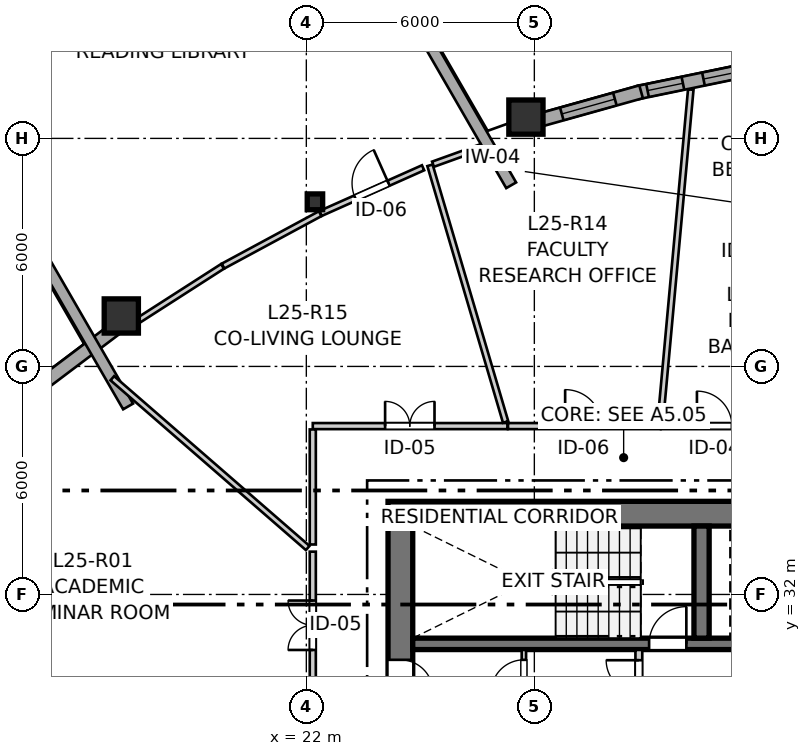
"""IFC4 building model, lengths in metres.
Left out: names, types, materials, properties, quantities, classifications, styles, units other than length and angle.
Written with IfcOpenShell. Run it as: python <this file> out.ifc"""

import sys

from ifc_helpers import new_model, si_unit, direction, frame, frame_2d, origin, origin_2d, place, context, subcontext, project, spatial, rectangle, i_section, extrude, source, transform, mapped, element, fill, save


model = new_model("IFC4")
c1 = context("Model", 3, precision=1e-05, world=origin(), true_north=direction((0.0, 1.0)))
c2 = subcontext(c1, "Body", "Model", "MODEL_VIEW")
j1 = project(units=[si_unit("LENGTHUNIT", "METRE"), si_unit("PLANEANGLEUNIT", "RADIAN")], contexts=[c1])
p1 = place(None, origin())
s1 = spatial("IfcSite", under=j1, at=p1, CompositionType="ELEMENT")
p2 = place(p1, origin())
s2 = spatial("IfcBuilding", under=s1, at=p2, CompositionType="ELEMENT")
p3 = place(p2, frame((0.0, 0.0, 86.4)))
s3 = spatial("IfcBuildingStorey", under=s2, at=p3, CompositionType="ELEMENT", Elevation=86.4)
p4 = place(p3, frame((36.55, 34.125, 0.0), z_axis=(0.0, 0.0, 1.0), x_axis=(-1.0, 0.0, 0.0)))
e1 = element("IfcWall", 1, at=p4, inside=s3, PredefinedType="SHEAR", context=c2, shape_type="SweptSolid", body=[
    extrude(rectangle(XDim=12.4, YDim=0.65, at=frame_2d((6.2, 0.0))), origin(), (0.0, 0.0, 1.0), 2.95),
])
p5 = place(p3, frame((24.475, 33.8, 0.0), z_axis=(0.0, 0.0, 1.0), x_axis=(0.0, -1.0, 0.0)))
e2 = element("IfcWall", 2, at=p5, inside=s3, PredefinedType="SHEAR", context=c2, shape_type="SweptSolid", body=[
    extrude(rectangle(XDim=15.6, YDim=0.65, at=frame_2d((7.8, 0.0))), origin(), (0.0, 0.0, 1.0), 2.95),
])
p6 = place(p5, frame((7.05, 0.0, 0.0)))
e3 = element("IfcOpeningElement", 3, at=p6, cuts=e2, PredefinedType="OPENING", context=c2, shape_type="SweptSolid", body=[
    extrude(rectangle(XDim=1.5, YDim=2.15, at=frame_2d((0.75, 1.075))), frame((0.0, 0.335, 0.0), z_axis=(0.0, -1.0, 0.0), x_axis=(1.0, 0.0, 0.0)), (0.0, 0.0, 1.0), 0.67),
])
p7 = place(p5, frame((3.52, 0.0, 0.0)))
e4 = element("IfcOpeningElement", 4, at=p7, cuts=e2, PredefinedType="OPENING", context=c2, shape_type="SweptSolid", body=[
    extrude(rectangle(XDim=0.86, YDim=2.05, at=frame_2d((0.43, 1.025))), frame((0.0, 0.335, 0.0), z_axis=(0.0, -1.0, 0.0), x_axis=(1.0, 0.0, 0.0)), (0.0, 0.0, 1.0), 0.67),
])
p8 = place(p5, frame((11.22, 0.0, 0.0)))
e5 = element("IfcOpeningElement", 5, at=p8, cuts=e2, PredefinedType="OPENING", context=c2, shape_type="SweptSolid", body=[
    extrude(rectangle(XDim=0.86, YDim=2.05, at=frame_2d((0.43, 1.025))), frame((0.0, 0.335, 0.0), z_axis=(0.0, -1.0, 0.0), x_axis=(1.0, 0.0, 0.0)), (0.0, 0.0, 1.0), 0.67),
])
p9 = place(p3, frame((24.8, 30.7, 0.0), z_axis=(0.0, 0.0, 1.0), x_axis=(1.0, 0.0, 0.0)))
e6 = element("IfcWall", 6, at=p9, inside=s3, PredefinedType="SHEAR", context=c2, shape_type="SweptSolid", body=[
    extrude(rectangle(XDim=11.1, YDim=0.3, at=frame_2d((5.55, 0.0))), origin(), (0.0, 0.0, 1.0), 2.95),
])
p10 = place(p9, frame((6.22, 0.0, 0.0)))
e7 = element("IfcOpeningElement", 7, at=p10, cuts=e6, PredefinedType="OPENING", context=c2, shape_type="SweptSolid", body=[
    extrude(rectangle(XDim=0.98, YDim=2.15, at=frame_2d((0.49, 1.075))), frame((0.0, 0.16, 0.0), z_axis=(0.0, -1.0, 0.0), x_axis=(1.0, 0.0, 0.0)), (0.0, 0.0, 1.0), 0.32),
])
p11 = place(p9, frame((9.15, 0.0, 0.0)))
e8 = element("IfcOpeningElement", 8, at=p11, cuts=e6, PredefinedType="OPENING", context=c2, shape_type="SweptSolid", body=[
    extrude(rectangle(XDim=1.15, YDim=2.15, at=frame_2d((0.575, 1.075))), frame((0.0, 0.16, 0.0), z_axis=(0.0, -1.0, 0.0), x_axis=(1.0, 0.0, 0.0)), (0.0, 0.0, 1.0), 0.32),
])
p12 = place(p3, frame((32.4, 30.85, 0.0), z_axis=(0.0, 0.0, 1.0), x_axis=(0.0, 1.0, 0.0)))
e9 = element("IfcWall", 9, at=p12, inside=s3, PredefinedType="SHEAR", context=c2, shape_type="SweptSolid", body=[
    extrude(rectangle(XDim=2.95, YDim=0.4, at=frame_2d((1.475, 0.0))), origin(), (0.0, 0.0, 1.0), 2.95),
])
m1 = source(origin(), c2, "Body", "SweptSolid", [
    extrude(rectangle(XDim=0.9, YDim=0.9, at=origin_2d()), origin(), (0.0, 0.0, 1.0), 2.95),
])
p13 = place(p3, frame((27.779, 44.561, 0.0), z_axis=(0.0, 0.0, 1.0), x_axis=(1.0, 0.0, 0.0)))
e10 = element("IfcColumn", 10, at=p13, inside=s3, PredefinedType="COLUMN", context=c2, shape_type="MappedRepresentation", body=[
    mapped(m1, transform((0.0, 0.0, 0.0), x_axis=(1.0, 0.0, 0.0), y_axis=(0.0, 1.0, 0.0), z_axis=(0.0, 0.0, 1.0), scale=1.0)),
])
m2 = source(origin(), c2, "Body", "SweptSolid", [
    extrude(i_section(OverallWidth=0.406, OverallDepth=0.416, WebThickness=0.027, FlangeThickness=0.044, FilletRadius=0.015, at=origin_2d()), origin(), (0.0, 0.0, 1.0), 2.95),
])
p14 = place(p3, frame((22.227, 42.331, 0.0), z_axis=(0.0, 0.0, 1.0), x_axis=(1.0, 0.0, 0.0)))
e11 = element("IfcColumn", 11, at=p14, inside=s3, PredefinedType="PILASTER", context=c2, shape_type="MappedRepresentation", body=[
    mapped(m2, transform((0.0, 0.0, 0.0), x_axis=(1.0, 0.0, 0.0), y_axis=(0.0, 1.0, 0.0), z_axis=(0.0, 0.0, 1.0), scale=1.0)),
])
p15 = place(p3, frame((17.131, 39.327, 0.0), z_axis=(0.0, 0.0, 1.0), x_axis=(1.0, 0.0, 0.0)))
e12 = element("IfcColumn", 12, at=p15, inside=s3, PredefinedType="COLUMN", context=c2, shape_type="MappedRepresentation", body=[
    mapped(m1, transform((0.0, 0.0, 0.0), x_axis=(1.0, 0.0, 0.0), y_axis=(0.0, 1.0, 0.0), z_axis=(0.0, 0.0, 1.0), scale=1.0)),
])
p16 = place(p3, frame((33.803, 45.84, 0.0), z_axis=(0.0, 0.0, 1.0), x_axis=(-0.97943222174, -0.201773444777, 0.0)))
e13 = element("IfcWall", 13, at=p16, inside=s3, PredefinedType="SOLIDWALL", context=c2, shape_type="SweptSolid", body=[
    extrude(rectangle(XDim=3.144, YDim=0.35, at=frame_2d((1.572, 0.0))), origin(), (0.0, 0.0, 1.0), 2.48),
])
p17 = place(p16, frame((0.431, 0.0, 0.82)))
e14 = element("IfcOpeningElement", 14, at=p17, cuts=e13, PredefinedType="OPENING", context=c2, shape_type="SweptSolid", body=[
    extrude(rectangle(XDim=0.95, YDim=1.35, at=frame_2d((0.475, 0.675))), frame((0.0, 0.185, 0.0), z_axis=(0.0, -1.0, 0.0), x_axis=(1.0, 0.0, 0.0)), (0.0, 0.0, 1.0), 0.37),
])
p18 = place(p16, frame((1.933, 0.0, 0.82)))
e15 = element("IfcOpeningElement", 15, at=p18, cuts=e13, PredefinedType="OPENING", context=c2, shape_type="SweptSolid", body=[
    extrude(rectangle(XDim=0.95, YDim=1.35, at=frame_2d((0.475, 0.675))), frame((0.0, 0.185, 0.0), z_axis=(0.0, -1.0, 0.0), x_axis=(1.0, 0.0, 0.0)), (0.0, 0.0, 1.0), 0.37),
])
p19 = place(p3, frame((30.809, 45.227, 0.0), z_axis=(0.0, 0.0, 1.0), x_axis=(-0.963041637143, -0.269352566591, 0.0)))
e16 = element("IfcWall", 16, at=p19, inside=s3, PredefinedType="SOLIDWALL", context=c2, shape_type="SweptSolid", body=[
    extrude(rectangle(XDim=2.873, YDim=0.35, at=frame_2d((1.437, 0.0))), origin(), (0.0, 0.0, 1.0), 2.48),
])
p20 = place(p19, frame((0.717, 0.0, 0.82)))
e17 = element("IfcOpeningElement", 17, at=p20, cuts=e16, PredefinedType="OPENING", context=c2, shape_type="SweptSolid", body=[
    extrude(rectangle(XDim=1.45, YDim=1.25, at=frame_2d((0.725, 0.625))), frame((0.0, 0.185, 0.0), z_axis=(0.0, -1.0, 0.0), x_axis=(1.0, 0.0, 0.0)), (0.0, 0.0, 1.0), 0.37),
])
p21 = place(p3, frame((17.057, 39.052, 0.0), z_axis=(0.0, 0.0, 1.0), x_axis=(-0.798379678642, -0.602154372841, 0.0)))
e18 = element("IfcWall", 18, at=p21, inside=s3, PredefinedType="SOLIDWALL", context=c2, shape_type="SweptSolid", body=[
    extrude(rectangle(XDim=2.79, YDim=0.35, at=frame_2d((1.395, 0.0))), origin(), (0.0, 0.0, 1.0), 2.48),
])
for number, where, z_axis, x_axis in (
    (19, (17.31, 36.946, 0.0), (0.0, 0.0, 1.0), (-0.5, 0.866, 0.0)),
    (20, (27.39, 42.766, 0.0), (0.0, 0.0, 1.0), (-0.5, 0.866, 0.0)),
):
    element("IfcWall", number, at=place(p3, frame(where, z_axis=z_axis, x_axis=x_axis)), inside=s3, PredefinedType="SOLIDWALL", context=c2, shape_type="SweptSolid", body=[
        extrude(rectangle(XDim=20.603, YDim=0.3, at=frame_2d((10.302, 0.0))), origin(), (0.0, 0.0, 1.0), 2.13),
    ])
p22 = place(p3, frame((30.75, 27.43, 0.0), z_axis=(0.0, 0.0, 1.0), x_axis=(0.0, 1.0, 0.0)))
e21 = element("IfcWall", 21, at=p22, inside=s3, PredefinedType="PARTITIONING", context=c2, shape_type="SweptSolid", body=[
    extrude(rectangle(XDim=3.11, YDim=0.18, at=frame_2d((1.555, 0.0))), origin(), (0.0, 0.0, 1.0), 2.95),
])
p23 = place(p22, frame((1.98, 0.0, 0.0)))
e22 = element("IfcOpeningElement", 22, at=p23, cuts=e21, PredefinedType="OPENING", context=c2, shape_type="SweptSolid", body=[
    extrude(rectangle(XDim=0.86, YDim=2.05, at=frame_2d((0.43, 1.025))), frame((0.0, 0.1, 0.0), z_axis=(0.0, -1.0, 0.0), x_axis=(1.0, 0.0, 0.0)), (0.0, 0.0, 1.0), 0.2),
])
p24 = place(p3, frame((27.725, 29.16, 0.0), z_axis=(0.0, 0.0, 1.0), x_axis=(0.0, 1.0, 0.0)))
e23 = element("IfcWall", 23, at=p24, inside=s3, PredefinedType="PARTITIONING", context=c2, shape_type="SweptSolid", body=[
    extrude(rectangle(XDim=1.38, YDim=0.115, at=frame_2d((0.69, 0.0))), origin(), (0.0, 0.0, 1.0), 2.95),
])
p25 = place(p24, frame((0.26, 0.0, 0.0)))
e24 = element("IfcOpeningElement", 24, at=p25, cuts=e23, PredefinedType="OPENING", context=c2, shape_type="SweptSolid", body=[
    extrude(rectangle(XDim=0.86, YDim=2.05, at=frame_2d((0.43, 1.025))), frame((0.0, 0.067, 0.0), z_axis=(0.0, -1.0, 0.0), x_axis=(1.0, 0.0, 0.0)), (0.0, 0.0, 1.0), 0.135),
])
p26 = place(p3, frame((22.17, 27.85, 0.0), z_axis=(0.0, 0.0, 1.0), x_axis=(0.0, 1.0, 0.0)))
e25 = element("IfcWall", 25, at=p26, inside=s3, PredefinedType="PARTITIONING", context=c2, shape_type="SweptSolid", body=[
    extrude(rectangle(XDim=5.276, YDim=0.16, at=frame_2d((2.638, 0.0))), origin(), (0.0, 0.0, 1.0), 2.95),
])
p27 = place(p26, frame((2.689, 0.0, 0.0)))
e26 = element("IfcOpeningElement", 26, at=p27, cuts=e25, PredefinedType="OPENING", context=c2, shape_type="SweptSolid", body=[
    extrude(rectangle(XDim=1.3, YDim=2.1, at=frame_2d((0.65, 1.05))), frame((0.0, 0.09, 0.0), z_axis=(0.0, -1.0, 0.0), x_axis=(1.0, 0.0, 0.0)), (0.0, 0.0, 1.0), 0.18),
])
p28 = place(p3, frame((22.17, 36.43, 0.0), z_axis=(0.0, 0.0, 1.0), x_axis=(1.0, 0.0, 0.0)))
e27 = element("IfcWall", 27, at=p28, inside=s3, PredefinedType="PARTITIONING", context=c2, shape_type="SweptSolid", body=[
    extrude(rectangle(XDim=5.122, YDim=0.16, at=frame_2d((2.561, 0.0))), origin(), (0.0, 0.0, 1.0), 2.588),
])
p29 = place(p28, frame((1.903, 0.0, 0.0)))
e28 = element("IfcOpeningElement", 28, at=p29, cuts=e27, PredefinedType="OPENING", context=c2, shape_type="SweptSolid", body=[
    extrude(rectangle(XDim=1.3, YDim=2.1, at=frame_2d((0.65, 1.05))), frame((0.0, 0.09, 0.0), z_axis=(0.0, -1.0, 0.0), x_axis=(1.0, 0.0, 0.0)), (0.0, 0.0, 1.0), 0.18),
])
p30 = place(p3, frame((27.307, 36.43, 0.0), z_axis=(0.0, 0.0, 1.0), x_axis=(1.0, 0.0, 0.0)))
e29 = element("IfcWall", 29, at=p30, inside=s3, PredefinedType="PARTITIONING", context=c2, shape_type="SweptSolid", body=[
    extrude(rectangle(XDim=4.013, YDim=0.16, at=frame_2d((2.007, 0.0))), origin(), (0.0, 0.0, 1.0), 2.95),
])
p31 = place(p30, frame((1.503, 0.0, 0.0)))
e30 = element("IfcOpeningElement", 30, at=p31, cuts=e29, PredefinedType="OPENING", context=c2, shape_type="SweptSolid", body=[
    extrude(rectangle(XDim=0.96, YDim=2.1, at=frame_2d((0.48, 1.05))), frame((0.0, 0.09, 0.0), z_axis=(0.0, -1.0, 0.0), x_axis=(1.0, 0.0, 0.0)), (0.0, 0.0, 1.0), 0.18),
])
p32 = place(p3, frame((22.377, 42.026, 0.0), z_axis=(0.0, 0.0, 1.0), x_axis=(0.913387960111, 0.407090204162, 0.0)))
e31 = element("IfcWall", 31, at=p32, inside=s3, PredefinedType="PARTITIONING", context=c2, shape_type="SweptSolid", body=[
    extrude(rectangle(XDim=2.951, YDim=0.145, at=frame_2d((1.475, 0.0))), origin(), (0.0, 0.0, 1.0), 2.468),
])
p33 = place(p32, frame((0.995, 0.0, 0.0)))
e32 = element("IfcOpeningElement", 32, at=p33, cuts=e31, PredefinedType="OPENING", context=c2, shape_type="SweptSolid", body=[
    extrude(rectangle(XDim=0.96, YDim=2.1, at=frame_2d((0.48, 1.05))), frame((0.0, 0.083, 0.0), z_axis=(0.0, -1.0, 0.0), x_axis=(1.0, 0.0, 0.0)), (0.0, 0.0, 1.0), 0.165),
])
p34 = place(p3, frame((31.335, 36.43, 0.0), z_axis=(0.0, 0.0, 1.0), x_axis=(1.0, 0.0, 0.0)))
e33 = element("IfcWall", 33, at=p34, inside=s3, PredefinedType="PARTITIONING", context=c2, shape_type="SweptSolid", body=[
    extrude(rectangle(XDim=2.806, YDim=0.16, at=frame_2d((1.403, 0.0))), origin(), (0.0, 0.0, 1.0), 2.95),
])
p35 = place(p34, frame((0.944, 0.0, 0.0)))
e34 = element("IfcOpeningElement", 34, at=p35, cuts=e33, PredefinedType="OPENING", context=c2, shape_type="SweptSolid", body=[
    extrude(rectangle(XDim=0.92, YDim=2.1, at=frame_2d((0.46, 1.05))), frame((0.0, 0.09, 0.0), z_axis=(0.0, -1.0, 0.0), x_axis=(1.0, 0.0, 0.0)), (0.0, 0.0, 1.0), 0.18),
])
p36 = place(p3, frame((31.314, 36.525, 0.0), z_axis=(0.0, 0.0, 1.0), x_axis=(0.091226381691, 0.995830179942, 0.0)))
e35 = element("IfcWall", 35, at=p36, inside=s3, PredefinedType="PARTITIONING", context=c2, shape_type="SweptSolid", body=[
    extrude(rectangle(XDim=8.797, YDim=0.145, at=frame_2d((4.398, 0.0))), origin(), (0.0, 0.0, 1.0), 2.95),
])
p37 = place(p3, frame((16.895, 37.69, 0.0), z_axis=(0.0, 0.0, 1.0), x_axis=(0.754854710059, -0.655892038907, 0.0)))
e36 = element("IfcWall", 36, at=p37, inside=s3, PredefinedType="PARTITIONING", context=c2, shape_type="SweptSolid", body=[
    extrude(rectangle(XDim=6.811, YDim=0.145, at=frame_2d((3.406, 0.0))), origin(), (0.0, 0.0, 1.0), 2.118),
])
p38 = place(p3, frame((25.254, 43.292, 0.0), z_axis=(0.0, 0.0, 1.0), x_axis=(0.282661880608, -0.959219610543, 0.0)))
e37 = element("IfcWall", 37, at=p38, inside=s3, PredefinedType="PARTITIONING", context=c2, shape_type="SweptSolid", body=[
    extrude(rectangle(XDim=7.041, YDim=0.145, at=frame_2d((3.521, 0.0))), origin(), (0.0, 0.0, 1.0), 2.95),
])
p39 = place(p3, frame((22.17, 33.315, 0.0), z_axis=(0.0, 0.0, 1.0), x_axis=(0.0, 1.0, 0.0)))
e38 = element("IfcWall", 38, at=p39, inside=s3, PredefinedType="PARTITIONING", context=c2, shape_type="SweptSolid", body=[
    extrude(rectangle(XDim=3.027, YDim=0.16, at=frame_2d((1.514, 0.0))), origin(), (0.0, 0.0, 1.0), 2.95),
])
p40 = place(p3, frame((17.326, 39.048, 0.0), z_axis=(0.0, 0.0, 1.0), x_axis=(0.841527071554, 0.540214945963, 0.0)))
e39 = element("IfcWall", 39, at=p40, inside=s3, PredefinedType="PARTITIONING", context=c2, shape_type="SweptSolid", body=[
    extrude(rectangle(XDim=2.934, YDim=0.145, at=frame_2d((1.467, 0.0))), origin(), (0.0, 0.0, 1.0), 2.468),
])
p41 = place(p3, frame((19.808, 40.64, 0.0), z_axis=(0.0, 0.0, 1.0), x_axis=(0.880106382364, 0.474776532404, 0.0)))
e40 = element("IfcWall", 40, at=p41, inside=s3, PredefinedType="PARTITIONING", context=c2, shape_type="SweptSolid", body=[
    extrude(rectangle(XDim=2.904, YDim=0.145, at=frame_2d((1.452, 0.0))), origin(), (0.0, 0.0, 1.0), 2.468),
])
p42 = place(p3, frame((25.334, 43.321, 0.0), z_axis=(0.0, 0.0, 1.0), x_axis=(0.940956330278, 0.3385279671, 0.0)))
e41 = element("IfcWall", 41, at=p42, inside=s3, PredefinedType="PARTITIONING", context=c2, shape_type="SweptSolid", body=[
    extrude(rectangle(XDim=1.354, YDim=0.145, at=frame_2d((0.677, 0.0))), origin(), (0.0, 0.0, 1.0), 2.468),
])
m3 = source(origin(), c2, "Body", "SweptSolid", [
    extrude(rectangle(XDim=0.95, YDim=1.35, at=frame_2d((0.475, 0.675))), frame((0.0, 0.03, 0.0), z_axis=(0.0, -1.0, 0.0), x_axis=(1.0, 0.0, 0.0)), (0.0, 0.0, 1.0), 0.06),
])
p43 = place(p17, origin())
e42 = element("IfcWindow", 42, at=p43, inside=s3, PartitioningType="SINGLE_PANEL", PredefinedType="WINDOW", context=c2, shape_type="MappedRepresentation", body=[
    mapped(m3, transform((0.0, 0.0, 0.0), x_axis=(1.0, 0.0, 0.0), y_axis=(0.0, 1.0, 0.0), z_axis=(0.0, 0.0, 1.0), scale=1.0)),
])
fill(e14, e42)
p44 = place(p18, origin())
e43 = element("IfcWindow", 43, at=p44, inside=s3, PartitioningType="SINGLE_PANEL", PredefinedType="WINDOW", context=c2, shape_type="MappedRepresentation", body=[
    mapped(m3, transform((0.0, 0.0, 0.0), x_axis=(1.0, 0.0, 0.0), y_axis=(0.0, 1.0, 0.0), z_axis=(0.0, 0.0, 1.0), scale=1.0)),
])
fill(e15, e43)
m4 = source(origin(), c2, "Body", "SweptSolid", [
    extrude(rectangle(XDim=1.45, YDim=1.25, at=frame_2d((0.725, 0.625))), frame((0.0, 0.03, 0.0), z_axis=(0.0, -1.0, 0.0), x_axis=(1.0, 0.0, 0.0)), (0.0, 0.0, 1.0), 0.06),
])
p45 = place(p20, origin())
e44 = element("IfcWindow", 44, at=p45, inside=s3, PartitioningType="SINGLE_PANEL", PredefinedType="WINDOW", context=c2, shape_type="MappedRepresentation", body=[
    mapped(m4, transform((0.0, 0.0, 0.0), x_axis=(1.0, 0.0, 0.0), y_axis=(0.0, 1.0, 0.0), z_axis=(0.0, 0.0, 1.0), scale=1.0)),
])
fill(e17, e44)
m5 = source(origin(), c2, "Body", "SweptSolid", [
    extrude(rectangle(XDim=0.98, YDim=2.15, at=frame_2d((0.49, 1.075))), frame((0.0, 0.025, 0.0), z_axis=(0.0, -1.0, 0.0), x_axis=(1.0, 0.0, 0.0)), (0.0, 0.0, 1.0), 0.05),
])
p46 = place(p10, origin())
e45 = element("IfcDoor", 45, at=p46, inside=s3, OperationType="SINGLE_SWING_RIGHT", PredefinedType="DOOR", context=c2, shape_type="MappedRepresentation", body=[
    mapped(m5, transform((0.0, 0.0, 0.0), x_axis=(1.0, 0.0, 0.0), y_axis=(0.0, 1.0, 0.0), z_axis=(0.0, 0.0, 1.0), scale=1.0)),
])
fill(e7, e45)
m6 = source(origin(), c2, "Body", "SweptSolid", [
    extrude(rectangle(XDim=0.86, YDim=2.05, at=frame_2d((0.43, 1.025))), frame((0.0, 0.025, 0.0), z_axis=(0.0, -1.0, 0.0), x_axis=(1.0, 0.0, 0.0)), (0.0, 0.0, 1.0), 0.05),
])
p47 = place(p7, origin())
e46 = element("IfcDoor", 46, at=p47, inside=s3, OperationType="SINGLE_SWING_RIGHT", PredefinedType="DOOR", context=c2, shape_type="MappedRepresentation", body=[
    mapped(m6, transform((0.0, 0.0, 0.0), x_axis=(1.0, 0.0, 0.0), y_axis=(0.0, 1.0, 0.0), z_axis=(0.0, 0.0, 1.0), scale=1.0)),
])
fill(e4, e46)
p48 = place(p23, origin())
e47 = element("IfcDoor", 47, at=p48, inside=s3, OperationType="SINGLE_SWING_RIGHT", PredefinedType="DOOR", context=c2, shape_type="MappedRepresentation", body=[
    mapped(m6, transform((0.0, 0.0, 0.0), x_axis=(1.0, 0.0, 0.0), y_axis=(0.0, 1.0, 0.0), z_axis=(0.0, 0.0, 1.0), scale=1.0)),
])
fill(e22, e47)
p49 = place(p25, origin())
e48 = element("IfcDoor", 48, at=p49, inside=s3, OperationType="SINGLE_SWING_LEFT", PredefinedType="DOOR", context=c2, shape_type="MappedRepresentation", body=[
    mapped(m6, transform((0.0, 0.0, 0.0), x_axis=(1.0, 0.0, 0.0), y_axis=(0.0, 1.0, 0.0), z_axis=(0.0, 0.0, 1.0), scale=1.0)),
])
fill(e24, e48)
m7 = source(origin(), c2, "Body", "SweptSolid", [
    extrude(rectangle(XDim=1.3, YDim=2.1, at=frame_2d((0.65, 1.05))), frame((0.0, 0.025, 0.0), z_axis=(0.0, -1.0, 0.0), x_axis=(1.0, 0.0, 0.0)), (0.0, 0.0, 1.0), 0.05),
])
p50 = place(p27, origin())
e49 = element("IfcDoor", 49, at=p50, inside=s3, OperationType="DOUBLE_DOOR_SINGLE_SWING", PredefinedType="DOOR", context=c2, shape_type="MappedRepresentation", body=[
    mapped(m7, transform((0.0, 0.0, 0.0), x_axis=(1.0, 0.0, 0.0), y_axis=(0.0, 1.0, 0.0), z_axis=(0.0, 0.0, 1.0), scale=1.0)),
])
fill(e26, e49)
p51 = place(p29, origin())
e50 = element("IfcDoor", 50, at=p51, inside=s3, OperationType="DOUBLE_DOOR_SINGLE_SWING", PredefinedType="DOOR", context=c2, shape_type="MappedRepresentation", body=[
    mapped(m7, transform((0.0, 0.0, 0.0), x_axis=(1.0, 0.0, 0.0), y_axis=(0.0, 1.0, 0.0), z_axis=(0.0, 0.0, 1.0), scale=1.0)),
])
fill(e28, e50)
m8 = source(origin(), c2, "Body", "SweptSolid", [
    extrude(rectangle(XDim=0.96, YDim=2.1, at=frame_2d((0.48, 1.05))), frame((0.0, 0.025, 0.0), z_axis=(0.0, -1.0, 0.0), x_axis=(1.0, 0.0, 0.0)), (0.0, 0.0, 1.0), 0.05),
])
p52 = place(p31, origin())
e51 = element("IfcDoor", 51, at=p52, inside=s3, OperationType="SINGLE_SWING_LEFT", PredefinedType="DOOR", context=c2, shape_type="MappedRepresentation", body=[
    mapped(m8, transform((0.0, 0.0, 0.0), x_axis=(1.0, 0.0, 0.0), y_axis=(0.0, 1.0, 0.0), z_axis=(0.0, 0.0, 1.0), scale=1.0)),
])
fill(e30, e51)
p53 = place(p33, origin())
e52 = element("IfcDoor", 52, at=p53, inside=s3, OperationType="SINGLE_SWING_RIGHT", PredefinedType="DOOR", context=c2, shape_type="MappedRepresentation", body=[
    mapped(m8, transform((0.0, 0.0, 0.0), x_axis=(1.0, 0.0, 0.0), y_axis=(0.0, 1.0, 0.0), z_axis=(0.0, 0.0, 1.0), scale=1.0)),
])
fill(e32, e52)
m9 = source(origin(), c2, "Body", "SweptSolid", [
    extrude(rectangle(XDim=0.92, YDim=2.1, at=frame_2d((0.46, 1.05))), frame((0.0, 0.025, 0.0), z_axis=(0.0, -1.0, 0.0), x_axis=(1.0, 0.0, 0.0)), (0.0, 0.0, 1.0), 0.05),
])
p54 = place(p35, origin())
e53 = element("IfcDoor", 53, at=p54, inside=s3, OperationType="SINGLE_SWING_LEFT", PredefinedType="DOOR", context=c2, shape_type="MappedRepresentation", body=[
    mapped(m9, transform((0.0, 0.0, 0.0), x_axis=(1.0, 0.0, 0.0), y_axis=(0.0, 1.0, 0.0), z_axis=(0.0, 0.0, 1.0), scale=1.0)),
])
fill(e34, e53)
save(model, sys.argv[1])
